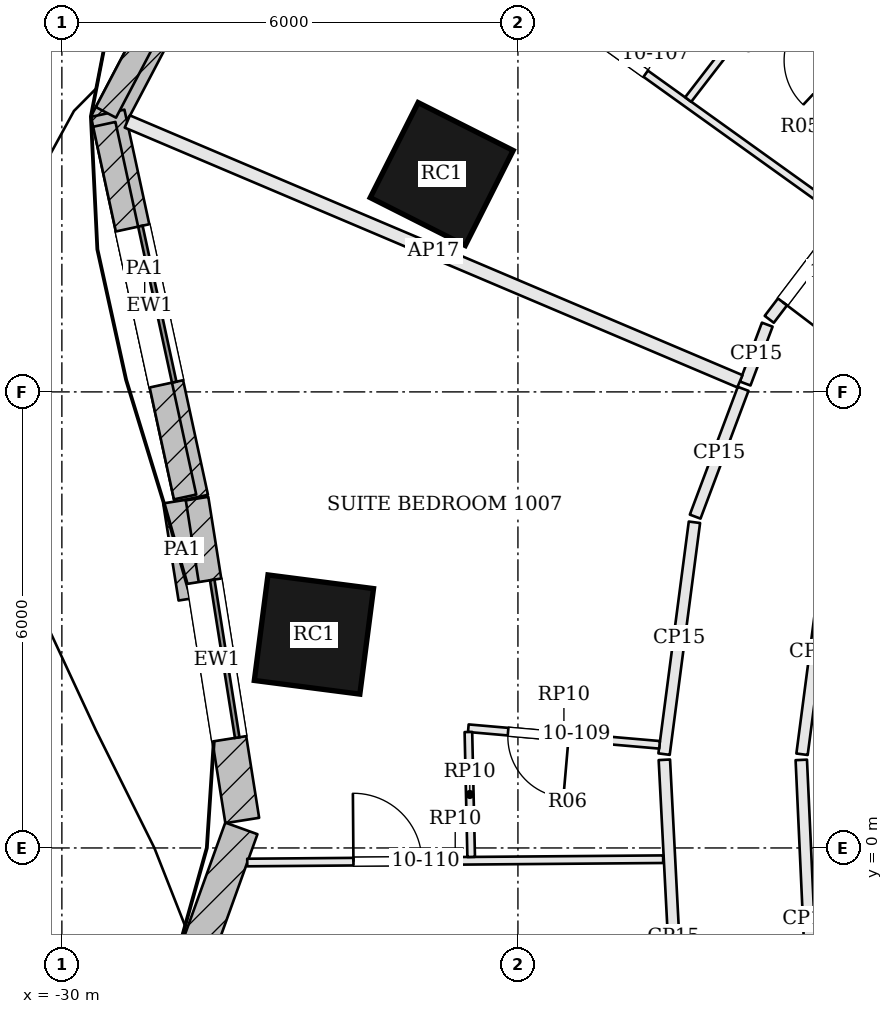
"""IFC4 building model, lengths in metres.
Left out: names, types, materials, properties, quantities, classifications, styles, units other than length and angle.
Written with IfcOpenShell. Run it as: python <this file> out.ifc"""

import sys

from ifc_helpers import new_model, si_unit, direction, frame, frame_2d, origin, origin_2d, place, context, subcontext, project, spatial, rectangle, extrude, element, fill, save


model = new_model("IFC4")
c1 = context("Model", 3, precision=1e-05, world=origin(), true_north=direction((0.0, 1.0)))
c2 = subcontext(c1, "Body", "Model", "MODEL_VIEW")
j1 = project(units=[si_unit("LENGTHUNIT", "METRE"), si_unit("PLANEANGLEUNIT", "RADIAN")], contexts=[c1])
p1 = place(None, origin())
s1 = spatial("IfcSite", under=j1, at=p1, CompositionType="ELEMENT")
p2 = place(p1, origin())
s2 = spatial("IfcBuilding", under=s1, at=p2, CompositionType="ELEMENT")
p3 = place(p2, frame((0.0, 0.0, 51.9)))
s3 = spatial("IfcBuildingStorey", under=s2, at=p3, CompositionType="ELEMENT", Elevation=51.9)
for number, where, z_axis, x_axis in (
    (1, (-25.003, 8.866, 0.0), (0.0, 0.0, 1.0), (-0.45, -0.893, 0.0)),
    (2, (-26.684, 2.808, 0.0), (0.0, 0.0, 1.0), (-0.128, -0.992, 0.0)),
):
    element("IfcColumn", number, at=place(p3, frame(where, z_axis=z_axis, x_axis=x_axis)), inside=s3, PredefinedType="COLUMN", context=c2, shape_type="SweptSolid", body=[
        extrude(rectangle(XDim=1.4, YDim=1.4, at=origin_2d()), origin(), (0.0, 0.0, 1.0), 3.6),
    ])
p4 = place(p3, frame((-27.153, 13.831, 0.0), z_axis=(0.0, 0.0, 1.0), x_axis=(-0.465165872942, -0.885223537108, 0.0)))
e3 = element("IfcWall", 3, at=p4, inside=s3, PredefinedType="SOLIDWALL", context=c2, shape_type="SweptSolid", body=[
    extrude(rectangle(XDim=4.871, YDim=0.45, at=frame_2d((2.436, 0.0))), origin(), (0.0, 0.0, 1.0), 3.4),
])
p5 = place(p4, frame((1.385, 0.0, 0.9)))
e4 = element("IfcOpeningElement", 4, at=p5, cuts=e3, PredefinedType="OPENING", context=c2, shape_type="SweptSolid", body=[
    extrude(rectangle(XDim=2.1, YDim=2.0, at=frame_2d((1.05, 1.0))), frame((0.0, 0.235, 0.0), z_axis=(0.0, -1.0, 0.0), x_axis=(1.0, 0.0, 0.0)), (0.0, 0.0, 1.0), 0.47),
])
p6 = place(p3, frame((-29.397, 9.666, 0.0), z_axis=(0.0, 0.0, 1.0), x_axis=(0.211962455994, -0.977277809657, 0.0)))
e5 = element("IfcWall", 5, at=p6, inside=s3, PredefinedType="SOLIDWALL", context=c2, shape_type="SweptSolid", body=[
    extrude(rectangle(XDim=5.186, YDim=0.45, at=frame_2d((2.593, 0.0))), origin(), (0.0, 0.0, 1.0), 3.4),
])
p7 = place(p6, frame((1.543, 0.0, 0.9)))
e6 = element("IfcOpeningElement", 6, at=p7, cuts=e5, PredefinedType="OPENING", context=c2, shape_type="SweptSolid", body=[
    extrude(rectangle(XDim=2.1, YDim=2.0, at=frame_2d((1.05, 1.0))), frame((0.0, 0.235, 0.0), z_axis=(0.0, -1.0, 0.0), x_axis=(1.0, 0.0, 0.0)), (0.0, 0.0, 1.0), 0.47),
])
p8 = place(p3, frame((-28.296, 4.584, 0.0), z_axis=(0.0, 0.0, 1.0), x_axis=(0.156402397796, -0.987693419014, 0.0)))
e7 = element("IfcWall", 7, at=p8, inside=s3, PredefinedType="SOLIDWALL", context=c2, shape_type="SweptSolid", body=[
    extrude(rectangle(XDim=4.276, YDim=0.45, at=frame_2d((2.138, 0.0))), origin(), (0.0, 0.0, 1.0), 3.4),
])
p9 = place(p8, frame((1.088, 0.0, 0.9)))
e8 = element("IfcOpeningElement", 8, at=p9, cuts=e7, PredefinedType="OPENING", context=c2, shape_type="SweptSolid", body=[
    extrude(rectangle(XDim=2.1, YDim=2.0, at=frame_2d((1.05, 1.0))), frame((0.0, 0.235, 0.0), z_axis=(0.0, -1.0, 0.0), x_axis=(1.0, 0.0, 0.0)), (0.0, 0.0, 1.0), 0.47),
])
p10 = place(p3, frame((-27.638, 0.257, 0.0), z_axis=(0.0, 0.0, 1.0), x_axis=(-0.338914809068, -0.940817066275, 0.0)))
e9 = element("IfcWall", 9, at=p10, inside=s3, PredefinedType="SOLIDWALL", context=c2, shape_type="SweptSolid", body=[
    extrude(rectangle(XDim=5.797, YDim=0.45, at=frame_2d((2.899, 0.0))), origin(), (0.0, 0.0, 1.0), 3.4),
])
p11 = place(p10, frame((1.999, 0.0, 0.9)))
e10 = element("IfcOpeningElement", 10, at=p11, cuts=e9, PredefinedType="OPENING", context=c2, shape_type="SweptSolid", body=[
    extrude(rectangle(XDim=1.8, YDim=2.0, at=frame_2d((0.9, 1.0))), frame((0.0, 0.235, 0.0), z_axis=(0.0, -1.0, 0.0), x_axis=(1.0, 0.0, 0.0)), (0.0, 0.0, 1.0), 0.47),
])
p12 = place(p3, frame((-27.495, 13.341, 3.6), z_axis=(0.0, 0.0, 1.0), x_axis=(-0.46519687666, -0.88520724463, 0.0)))
e11 = element("IfcWall", 11, at=p12, inside=s3, PredefinedType="PARAPET", context=c2, shape_type="SweptSolid", body=[
    extrude(rectangle(XDim=4.139, YDim=0.3, at=frame_2d((2.069, 0.0))), origin(), (0.0, 0.0, 1.0), 1.1),
])
p13 = place(p3, frame((-29.442, 9.52, 3.6), z_axis=(0.0, 0.0, 1.0), x_axis=(0.211918382355, -0.977287367779, 0.0)))
e12 = element("IfcWall", 12, at=p13, inside=s3, PredefinedType="PARAPET", context=c2, shape_type="SweptSolid", body=[
    extrude(rectangle(XDim=5.016, YDim=0.3, at=frame_2d((2.508, 0.0))), origin(), (0.0, 0.0, 1.0), 1.1),
])
p14 = place(p3, frame((-28.519, 4.556, 3.6), z_axis=(0.0, 0.0, 1.0), x_axis=(0.156466543472, -0.987683259337, 0.0)))
e13 = element("IfcWall", 13, at=p14, inside=s3, PredefinedType="PARAPET", context=c2, shape_type="SweptSolid", body=[
    extrude(rectangle(XDim=1.293, YDim=0.3, at=frame_2d((0.647, 0.0))), origin(), (0.0, 0.0, 1.0), 1.1),
])
p15 = place(p3, frame((-20.292, 13.608, 0.0), z_axis=(0.0, 0.0, 1.0), x_axis=(0.633888862279, -0.773424146428, 0.0)))
e14 = element("IfcWall", 14, at=p15, inside=s3, PredefinedType="PARTITIONING", context=c2, shape_type="SweptSolid", body=[
    extrude(rectangle(XDim=4.042, YDim=0.175, at=frame_2d((2.021, 0.0))), origin(), (0.0, 0.0, 1.0), 2.68),
])
p16 = place(p3, frame((-18.523, 9.811, 0.0), z_axis=(0.0, 0.0, 1.0), x_axis=(-0.605040130963, -0.796194976073, 0.0)))
e15 = element("IfcWall", 15, at=p16, inside=s3, PredefinedType="PARTITIONING", context=c2, shape_type="SweptSolid", body=[
    extrude(rectangle(XDim=3.588, YDim=0.15, at=frame_2d((1.794, 0.0))), origin(), (0.0, 0.0, 1.0), 2.68),
])
p17 = place(p16, frame((2.3, 0.0, 0.0)))
e16 = element("IfcOpeningElement", 16, at=p17, cuts=e15, PredefinedType="OPENING", context=c2, shape_type="SweptSolid", body=[
    extrude(rectangle(XDim=1.0, YDim=2.1, at=frame_2d((0.5, 1.05))), frame((0.0, 0.085, 0.0), z_axis=(0.0, -1.0, 0.0), x_axis=(1.0, 0.0, 0.0)), (0.0, 0.0, 1.0), 0.17),
])
p18 = place(p3, frame((-20.72, 6.885, 0.0), z_axis=(0.0, 0.0, 1.0), x_axis=(-0.351447073955, -0.936207751628, 0.0)))
e17 = element("IfcWall", 17, at=p18, inside=s3, PredefinedType="PARTITIONING", context=c2, shape_type="SweptSolid", body=[
    extrude(rectangle(XDim=0.827, YDim=0.15, at=frame_2d((0.413, 0.0))), origin(), (0.0, 0.0, 1.0), 2.68),
])
p19 = place(p3, frame((-29.139, 9.557, 0.0), z_axis=(0.0, 0.0, 1.0), x_axis=(0.920652865841, -0.390382249365, 0.0)))
e18 = element("IfcWall", 18, at=p19, inside=s3, PredefinedType="PARTITIONING", context=c2, shape_type="SweptSolid", body=[
    extrude(rectangle(XDim=8.754, YDim=0.175, at=frame_2d((4.377, 0.0))), origin(), (0.0, 0.0, 1.0), 2.68),
])
p20 = place(p3, frame((-21.037, 6.04, 0.0), z_axis=(0.0, 0.0, 1.0), x_axis=(-0.351451209017, -0.936206199339, 0.0)))
e19 = element("IfcWall", 19, at=p20, inside=s3, PredefinedType="PARTITIONING", context=c2, shape_type="SweptSolid", body=[
    extrude(rectangle(XDim=1.796, YDim=0.15, at=frame_2d((0.898, 0.0))), origin(), (0.0, 0.0, 1.0), 2.68),
])
p21 = place(p3, frame((-21.678, 4.285, 0.0), z_axis=(0.0, 0.0, 1.0), x_axis=(-0.129922755307, -0.991524118543, 0.0)))
e20 = element("IfcWall", 20, at=p21, inside=s3, PredefinedType="PARTITIONING", context=c2, shape_type="SweptSolid", body=[
    extrude(rectangle(XDim=3.076, YDim=0.15, at=frame_2d((1.538, 0.0))), origin(), (0.0, 0.0, 1.0), 2.68),
])
p22 = place(p3, frame((-22.074, 1.16, 0.0), z_axis=(0.0, 0.0, 1.0), x_axis=(0.051819296774, -0.998656477715, 0.0)))
e21 = element("IfcWall", 21, at=p22, inside=s3, PredefinedType="PARTITIONING", context=c2, shape_type="SweptSolid", body=[
    extrude(rectangle(XDim=4.678, YDim=0.15, at=frame_2d((2.339, 0.0))), origin(), (0.0, 0.0, 1.0), 2.68),
])
p23 = place(p22, frame((2.495, 0.0, 0.0)))
e22 = element("IfcOpeningElement", 22, at=p23, cuts=e21, PredefinedType="OPENING", context=c2, shape_type="SweptSolid", body=[
    extrude(rectangle(XDim=1.0, YDim=2.1, at=frame_2d((0.5, 1.05))), frame((0.0, 0.085, 0.0), z_axis=(0.0, -1.0, 0.0), x_axis=(1.0, 0.0, 0.0)), (0.0, 0.0, 1.0), 0.17),
])
p24 = place(p3, frame((-20.08, -3.025, 0.0), z_axis=(0.0, 0.0, 1.0), x_axis=(-0.04581750387, 0.998949826738, 0.0)))
e23 = element("IfcWall", 23, at=p24, inside=s3, PredefinedType="PARTITIONING", context=c2, shape_type="SweptSolid", body=[
    extrude(rectangle(XDim=4.188, YDim=0.15, at=frame_2d((2.094, 0.0))), origin(), (0.0, 0.0, 1.0), 2.68),
])
p25 = place(p3, frame((-20.262, 1.233, 0.0), z_axis=(0.0, 0.0, 1.0), x_axis=(0.129897568593, 0.991527418518, 0.0)))
e24 = element("IfcWall", 24, at=p25, inside=s3, PredefinedType="PARTITIONING", context=c2, shape_type="SweptSolid", body=[
    extrude(rectangle(XDim=2.71, YDim=0.15, at=frame_2d((1.355, 0.0))), origin(), (0.0, 0.0, 1.0), 2.68),
])
p26 = place(p3, frame((-27.033, 13.565, 0.0), z_axis=(0.0, 0.0, 1.0), x_axis=(0.812686383225, -0.582701332177, 0.0)))
e25 = element("IfcWall", 25, at=p26, inside=s3, PredefinedType="PARTITIONING", context=c2, shape_type="SweptSolid", body=[
    extrude(rectangle(XDim=8.975, YDim=0.1, at=frame_2d((4.488, 0.0))), origin(), (0.0, 0.0, 1.0), 2.898),
])
p27 = place(p26, frame((4.9, 0.0, 0.0)))
e26 = element("IfcOpeningElement", 26, at=p27, cuts=e25, PredefinedType="OPENING", context=c2, shape_type="SweptSolid", body=[
    extrude(rectangle(XDim=0.9, YDim=2.4, at=frame_2d((0.45, 1.2))), frame((0.0, 0.06, 0.0), z_axis=(0.0, -1.0, 0.0), x_axis=(1.0, 0.0, 0.0)), (0.0, 0.0, 1.0), 0.12),
])
p28 = place(p3, frame((-18.825, 9.538, 0.0), z_axis=(0.0, 0.0, 1.0), x_axis=(-0.728106307971, 0.685464225393, 0.0)))
e27 = element("IfcWall", 27, at=p28, inside=s3, PredefinedType="PARTITIONING", context=c2, shape_type="SweptSolid", body=[
    extrude(rectangle(XDim=2.525, YDim=0.1, at=frame_2d((1.262, 0.0))), origin(), (0.0, 0.0, 1.0), 2.898),
])
p29 = place(p28, frame((1.2, 0.0, 0.0)))
e28 = element("IfcOpeningElement", 28, at=p29, cuts=e27, PredefinedType="OPENING", context=c2, shape_type="SweptSolid", body=[
    extrude(rectangle(XDim=0.8, YDim=2.1, at=frame_2d((0.4, 1.05))), frame((0.0, 0.06, 0.0), z_axis=(0.0, -1.0, 0.0), x_axis=(1.0, 0.0, 0.0)), (0.0, 0.0, 1.0), 0.12),
])
p30 = place(p3, frame((-20.694, 11.229, 0.0), z_axis=(0.0, 0.0, 1.0), x_axis=(-0.610818482981, -0.791770661776, 0.0)))
e29 = element("IfcWall", 29, at=p30, inside=s3, PredefinedType="PARTITIONING", context=c2, shape_type="SweptSolid", body=[
    extrude(rectangle(XDim=1.746, YDim=0.1, at=frame_2d((0.873, 0.0))), origin(), (0.0, 0.0, 1.0), 2.898),
])
p31 = place(p3, frame((-27.561, -0.192, 0.0), z_axis=(0.0, 0.0, 1.0), x_axis=(0.999968109942, 0.007986181755, 0.0)))
e30 = element("IfcWall", 30, at=p31, inside=s3, PredefinedType="PARTITIONING", context=c2, shape_type="SweptSolid", body=[
    extrude(rectangle(XDim=5.472, YDim=0.1, at=frame_2d((2.736, 0.0))), origin(), (0.0, 0.0, 1.0), 2.898),
])
p32 = place(p31, frame((1.397, 0.0, 0.0)))
e31 = element("IfcOpeningElement", 31, at=p32, cuts=e30, PredefinedType="OPENING", context=c2, shape_type="SweptSolid", body=[
    extrude(rectangle(XDim=0.9, YDim=2.4, at=frame_2d((0.45, 1.2))), frame((0.0, 0.06, 0.0), z_axis=(0.0, -1.0, 0.0), x_axis=(1.0, 0.0, 0.0)), (0.0, 0.0, 1.0), 0.12),
])
p33 = place(p3, frame((-22.137, 1.357, 0.0), z_axis=(0.0, 0.0, 1.0), x_axis=(-0.996239862501, 0.086637961448, 0.0)))
e32 = element("IfcWall", 32, at=p33, inside=s3, PredefinedType="PARTITIONING", context=c2, shape_type="SweptSolid", body=[
    extrude(rectangle(XDim=2.525, YDim=0.1, at=frame_2d((1.262, 0.0))), origin(), (0.0, 0.0, 1.0), 2.898),
])
p34 = place(p33, frame((1.2, 0.0, 0.0)))
e33 = element("IfcOpeningElement", 33, at=p34, cuts=e32, PredefinedType="OPENING", context=c2, shape_type="SweptSolid", body=[
    extrude(rectangle(XDim=0.8, YDim=2.1, at=frame_2d((0.4, 1.05))), frame((0.0, 0.06, 0.0), z_axis=(0.0, -1.0, 0.0), x_axis=(1.0, 0.0, 0.0)), (0.0, 0.0, 1.0), 0.12),
])
p35 = place(p3, frame((-24.652, 1.525, 0.0), z_axis=(0.0, 0.0, 1.0), x_axis=(0.02212767644, -0.999755152993, 0.0)))
e34 = element("IfcWall", 34, at=p35, inside=s3, PredefinedType="PARTITIONING", context=c2, shape_type="SweptSolid", body=[
    extrude(rectangle(XDim=1.644, YDim=0.1, at=frame_2d((0.822, 0.0))), origin(), (0.0, 0.0, 1.0), 2.898),
])
p36 = place(p7, origin())
e35 = element("IfcWindow", 35, at=p36, inside=s3, PartitioningType="SINGLE_PANEL", PredefinedType="WINDOW", context=c2, shape_type="SweptSolid", body=[
    extrude(rectangle(XDim=2.1, YDim=2.0, at=frame_2d((1.05, 1.0))), frame((0.0, 0.135, 0.0), z_axis=(0.0, -1.0, 0.0), x_axis=(1.0, 0.0, 0.0)), (0.0, 0.0, 1.0), 0.06),
])
fill(e6, e35)
p37 = place(p9, origin())
e36 = element("IfcWindow", 36, at=p37, inside=s3, PartitioningType="SINGLE_PANEL", PredefinedType="WINDOW", context=c2, shape_type="SweptSolid", body=[
    extrude(rectangle(XDim=2.1, YDim=2.0, at=frame_2d((1.05, 1.0))), frame((0.0, 0.135, 0.0), z_axis=(0.0, -1.0, 0.0), x_axis=(1.0, 0.0, 0.0)), (0.0, 0.0, 1.0), 0.06),
])
fill(e8, e36)
p38 = place(p29, origin())
e37 = element("IfcDoor", 37, at=p38, inside=s3, OperationType="SINGLE_SWING_LEFT", PredefinedType="DOOR", context=c2, shape_type="SweptSolid", body=[
    extrude(rectangle(XDim=0.8, YDim=2.1, at=frame_2d((0.4, 1.05))), frame((0.0, 0.025, 0.0), z_axis=(0.0, -1.0, 0.0), x_axis=(1.0, 0.0, 0.0)), (0.0, 0.0, 1.0), 0.05),
])
fill(e28, e37)
p39 = place(p27, origin())
e38 = element("IfcDoor", 38, at=p39, inside=s3, OperationType="SINGLE_SWING_LEFT", PredefinedType="DOOR", context=c2, shape_type="SweptSolid", body=[
    extrude(rectangle(XDim=0.9, YDim=2.4, at=frame_2d((0.45, 1.2))), frame((0.0, 0.025, 0.0), z_axis=(0.0, -1.0, 0.0), x_axis=(1.0, 0.0, 0.0)), (0.0, 0.0, 1.0), 0.05),
])
fill(e26, e38)
p40 = place(p17, origin())
e39 = element("IfcDoor", 39, at=p40, inside=s3, OperationType="SINGLE_SWING_RIGHT", PredefinedType="DOOR", context=c2, shape_type="SweptSolid", body=[
    extrude(rectangle(XDim=1.0, YDim=2.1, at=frame_2d((0.5, 1.05))), frame((0.0, 0.025, 0.0), z_axis=(0.0, -1.0, 0.0), x_axis=(1.0, 0.0, 0.0)), (0.0, 0.0, 1.0), 0.05),
])
fill(e16, e39)
p41 = place(p34, origin())
e40 = element("IfcDoor", 40, at=p41, inside=s3, OperationType="SINGLE_SWING_LEFT", PredefinedType="DOOR", context=c2, shape_type="SweptSolid", body=[
    extrude(rectangle(XDim=0.8, YDim=2.1, at=frame_2d((0.4, 1.05))), frame((0.0, 0.025, 0.0), z_axis=(0.0, -1.0, 0.0), x_axis=(1.0, 0.0, 0.0)), (0.0, 0.0, 1.0), 0.05),
])
fill(e33, e40)
p42 = place(p32, origin())
e41 = element("IfcDoor", 41, at=p42, inside=s3, OperationType="SINGLE_SWING_LEFT", PredefinedType="DOOR", context=c2, shape_type="SweptSolid", body=[
    extrude(rectangle(XDim=0.9, YDim=2.4, at=frame_2d((0.45, 1.2))), frame((0.0, 0.025, 0.0), z_axis=(0.0, -1.0, 0.0), x_axis=(1.0, 0.0, 0.0)), (0.0, 0.0, 1.0), 0.05),
])
fill(e31, e41)
save(model, sys.argv[1])
